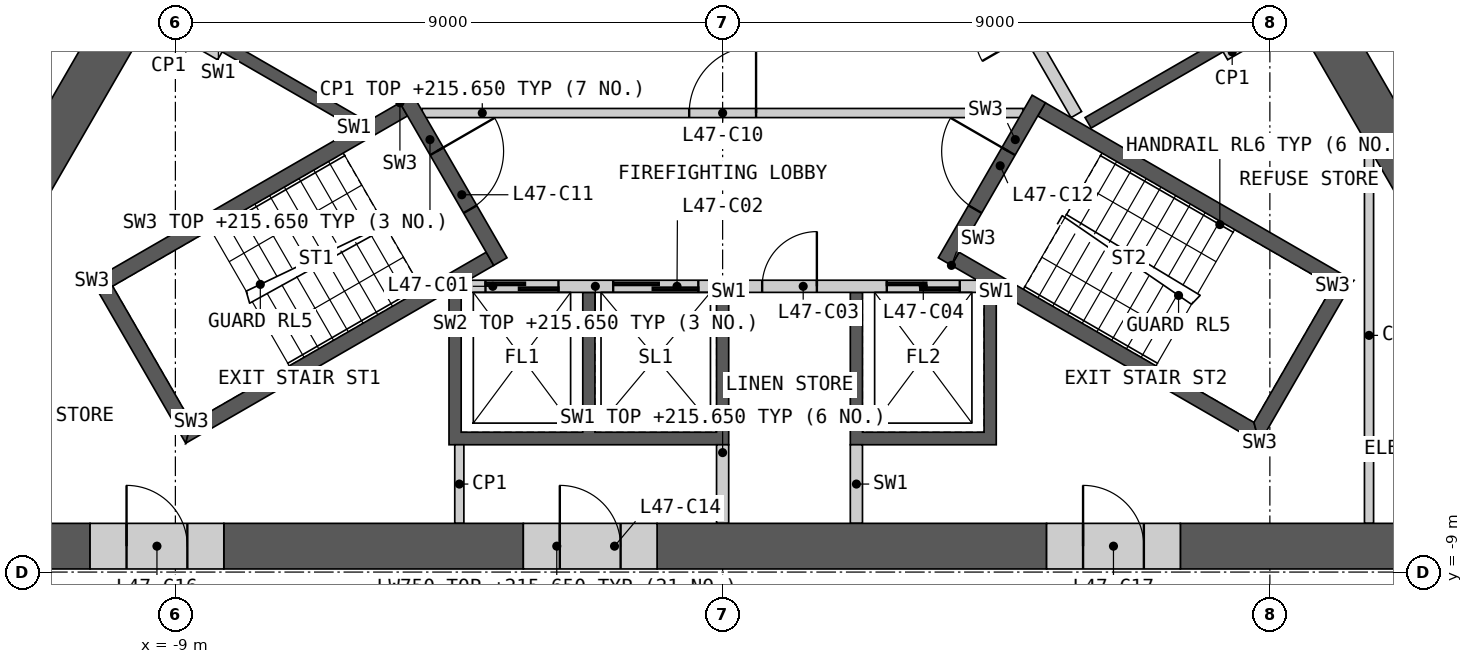
"""IFC4 building model, lengths in metres.
Left out: names, types, materials, properties, quantities, classifications, styles, units other than length and angle.
Written with IfcOpenShell. Run it as: python <this file> out.ifc"""

import sys

from ifc_helpers import new_model, si_unit, direction, frame, frame_2d, origin, place, context, subcontext, project, spatial, polyline, rectangle, outline, extrude, element, fill, save


model = new_model("IFC4")
c1 = context("Model", 3, precision=1e-05, world=origin(), true_north=direction((0.0, 1.0)))
c2 = subcontext(c1, "Body", "Model", "MODEL_VIEW")
j1 = project(units=[si_unit("LENGTHUNIT", "METRE"), si_unit("PLANEANGLEUNIT", "RADIAN")], contexts=[c1])
p1 = place(None, origin())
s1 = spatial("IfcSite", under=j1, at=p1, CompositionType="ELEMENT")
p2 = place(p1, origin())
s2 = spatial("IfcBuilding", under=s1, at=p2, CompositionType="ELEMENT")
p3 = place(p2, frame((0.0, 0.0, 212.4)))
s3 = spatial("IfcBuildingStorey", under=s2, at=p3, CompositionType="ELEMENT", Elevation=212.4)
p4 = place(p3, origin())
e1 = element("IfcWall", 1, at=p4, inside=s3, PredefinedType="SHEAR", context=c2, shape_type="SweptSolid", body=[
    extrude(outline(polyline([(4.5, -4.4), (4.5, -6.906), (2.1, -6.906), (2.1, -4.4), (2.3, -4.4), (2.3, -6.7), (4.3, -6.7), (4.3, -4.4), (4.5, -4.4)])), origin(), (0.0, 0.0, 1.0), 3.25),
])
p5 = place(p3, origin())
e2 = element("IfcWall", 2, at=p5, inside=s3, PredefinedType="SHEAR", context=c2, shape_type="SweptSolid", body=[
    extrude(outline(polyline([(0.1, -4.4), (0.1, -6.906), (-4.5, -6.906), (-4.5, -4.4), (-4.3, -4.4), (-4.3, -6.7), (-2.3, -6.7), (-2.3, -4.4), (-2.1, -4.4), (-2.1, -6.7), (-0.1, -6.7), (-0.1, -4.4), (0.1, -4.4)])), origin(), (0.0, 0.0, 1.0), 3.25),
])
p6 = place(p3, frame((-4.187, -4.3, 0.0), z_axis=(0.0, 0.0, 1.0), x_axis=(1.0, 0.0, 0.0)))
e3 = element("IfcWall", 3, at=p6, inside=s3, PredefinedType="SOLIDWALL", context=c2, shape_type="SweptSolid", body=[
    extrude(rectangle(XDim=8.373, YDim=0.2, at=frame_2d((4.187, 0.0))), origin(), (0.0, 0.0, 1.0), 3.25),
])
p7 = place(p6, frame((0.287, 0.0, 0.0)))
e4 = element("IfcOpeningElement", 4, at=p7, cuts=e3, PredefinedType="OPENING", context=c2, shape_type="SweptSolid", body=[
    extrude(rectangle(XDim=1.2, YDim=2.1, at=frame_2d((0.6, 1.05))), frame((0.0, 0.11, 0.0), z_axis=(0.0, -1.0, 0.0), x_axis=(1.0, 0.0, 0.0)), (0.0, 0.0, 1.0), 0.22),
])
p8 = place(p6, frame((2.387, 0.0, 0.0)))
e5 = element("IfcOpeningElement", 5, at=p8, cuts=e3, PredefinedType="OPENING", context=c2, shape_type="SweptSolid", body=[
    extrude(rectangle(XDim=1.4, YDim=2.1, at=frame_2d((0.7, 1.05))), frame((0.0, 0.11, 0.0), z_axis=(0.0, -1.0, 0.0), x_axis=(1.0, 0.0, 0.0)), (0.0, 0.0, 1.0), 0.22),
])
p9 = place(p6, frame((4.837, 0.0, 0.0)))
e6 = element("IfcOpeningElement", 6, at=p9, cuts=e3, PredefinedType="OPENING", context=c2, shape_type="SweptSolid", body=[
    extrude(rectangle(XDim=0.9, YDim=2.1, at=frame_2d((0.45, 1.05))), frame((0.0, 0.11, 0.0), z_axis=(0.0, -1.0, 0.0), x_axis=(1.0, 0.0, 0.0)), (0.0, 0.0, 1.0), 0.22),
])
p10 = place(p6, frame((6.887, 0.0, 0.0)))
e7 = element("IfcOpeningElement", 7, at=p10, cuts=e3, PredefinedType="OPENING", context=c2, shape_type="SweptSolid", body=[
    extrude(rectangle(XDim=1.2, YDim=2.1, at=frame_2d((0.6, 1.05))), frame((0.0, 0.11, 0.0), z_axis=(0.0, -1.0, 0.0), x_axis=(1.0, 0.0, 0.0)), (0.0, 0.0, 1.0), 0.22),
])
for number, where, z_axis, x_axis in (
    (8, (0.0, -6.906, 0.0), (0.0, 0.0, 1.0), (0.0, -1.0, 0.0)),
    (9, (2.2, -6.906, 0.0), (0.0, 0.0, 1.0), (0.0, -1.0, 0.0)),
):
    element("IfcWall", number, at=place(p3, frame(where, z_axis=z_axis, x_axis=x_axis)), inside=s3, PredefinedType="SHEAR", context=c2, shape_type="SweptSolid", body=[
        extrude(rectangle(XDim=1.293, YDim=0.2, at=frame_2d((0.646, 0.0))), origin(), (0.0, 0.0, 1.0), 3.25),
    ])
p11 = place(p3, origin())
e10 = element("IfcWall", 10, at=p11, inside=s3, PredefinedType="SHEAR", context=c2, shape_type="SweptSolid", body=[
    extrude(outline(polyline([(3.76, 2.287), (5.931, 3.54), (8.231, -0.444), (6.061, -1.697), (5.96, -1.524), (7.952, -0.374), (5.852, 3.263), (3.861, 2.113), (3.76, 2.287)])), origin(), (0.0, 0.0, 1.0), 3.25),
])
p12 = place(p3, frame((5.817, -1.476, 0.0), z_axis=(0.0, 0.0, 1.0), x_axis=(-0.500002616675, 0.866023893041, 0.0)))
e11 = element("IfcWall", 11, at=p12, inside=s3, PredefinedType="SOLIDWALL", context=c2, shape_type="SweptSolid", body=[
    extrude(rectangle(XDim=8.373, YDim=0.2, at=frame_2d((4.187, 0.0))), origin(), (0.0, 0.0, 1.0), 3.25),
])
p13 = place(p12, frame((1.537, 0.0, 0.0)))
e12 = element("IfcOpeningElement", 12, at=p13, cuts=e11, PredefinedType="OPENING", context=c2, shape_type="SweptSolid", body=[
    extrude(rectangle(XDim=0.9, YDim=2.1, at=frame_2d((0.45, 1.05))), frame((0.0, 0.11, 0.0), z_axis=(0.0, -1.0, 0.0), x_axis=(1.0, 0.0, 0.0)), (0.0, 0.0, 1.0), 0.22),
])
p14 = place(p12, frame((4.837, 0.0, 0.0)))
e13 = element("IfcOpeningElement", 13, at=p14, cuts=e11, PredefinedType="OPENING", context=c2, shape_type="SweptSolid", body=[
    extrude(rectangle(XDim=0.9, YDim=2.1, at=frame_2d((0.45, 1.05))), frame((0.0, 0.11, 0.0), z_axis=(0.0, -1.0, 0.0), x_axis=(1.0, 0.0, 0.0)), (0.0, 0.0, 1.0), 0.22),
])
p15 = place(p12, frame((6.937, 0.0, 0.0)))
e14 = element("IfcOpeningElement", 14, at=p15, cuts=e11, PredefinedType="OPENING", context=c2, shape_type="SweptSolid", body=[
    extrude(rectangle(XDim=1.1, YDim=2.1, at=frame_2d((0.55, 1.05))), frame((0.0, 0.11, 0.0), z_axis=(0.0, -1.0, 0.0), x_axis=(1.0, 0.0, 0.0)), (0.0, 0.0, 1.0), 0.22),
])
p16 = place(p3, origin())
e15 = element("IfcWall", 15, at=p16, inside=s3, PredefinedType="SHEAR", context=c2, shape_type="SweptSolid", body=[
    extrude(outline(polyline([(-6.061, -1.697), (-8.231, -0.444), (-8.131, -0.271), (-5.96, -1.524), (-6.061, -1.697)])), origin(), (0.0, 0.0, 1.0), 3.25),
])
p17 = place(p3, frame((-4.941, -1.45, 0.0), z_axis=(0.0, 0.0, 1.0), x_axis=(1.0, 0.0, 0.0)))
e16 = element("IfcWall", 16, at=p17, inside=s3, PredefinedType="PARTITIONING", context=c2, shape_type="SweptSolid", body=[
    extrude(rectangle(XDim=9.882, YDim=0.15, at=frame_2d((4.941, 0.0))), origin(), (0.0, 0.0, 1.0), 3.25),
])
p18 = place(p17, frame((4.391, 0.0, 0.0)))
e17 = element("IfcOpeningElement", 17, at=p18, cuts=e16, PredefinedType="OPENING", context=c2, shape_type="SweptSolid", body=[
    extrude(rectangle(XDim=1.1, YDim=2.1, at=frame_2d((0.55, 1.05))), frame((0.0, 0.085, 0.0), z_axis=(0.0, -1.0, 0.0), x_axis=(1.0, 0.0, 0.0)), (0.0, 0.0, 1.0), 0.17),
])
p19 = place(p3, origin())
e18 = element("IfcWall", 18, at=p19, inside=s3, PredefinedType="SHEAR", context=c2, shape_type="SweptSolid", body=[
    extrude(outline(polyline([(-5.307, -1.281), (-10.374, -4.206), (-10.032, -4.298), (-5.182, -1.498), (-5.307, -1.281)])), origin(), (0.0, 0.0, 1.0), 3.25),
])
p20 = place(p3, origin())
e19 = element("IfcWall", 19, at=p20, inside=s3, PredefinedType="SHEAR", context=c2, shape_type="SweptSolid", body=[
    extrude(outline(polyline([(-10.374, -4.206), (-8.83, -6.881), (-8.738, -6.539), (-10.032, -4.298), (-10.374, -4.206)])), origin(), (0.0, 0.0, 1.0), 3.25),
])
p21 = place(p3, origin())
e20 = element("IfcWall", 20, at=p21, inside=s3, PredefinedType="SHEAR", context=c2, shape_type="SweptSolid", body=[
    extrude(outline(polyline([(-8.738, -6.539), (-8.83, -6.881), (-3.763, -3.956), (-3.888, -3.739), (-8.738, -6.539)])), origin(), (0.0, 0.0, 1.0), 3.25),
])
p22 = place(p3, frame((-5.199, -1.219, 0.0), z_axis=(0.0, 0.0, 1.0), x_axis=(0.499982516597, -0.866035497597, 0.0)))
e21 = element("IfcWall", 21, at=p22, inside=s3, PredefinedType="SHEAR", context=c2, shape_type="SweptSolid", body=[
    extrude(rectangle(XDim=3.088, YDim=0.25, at=frame_2d((1.544, 0.0))), origin(), (0.0, 0.0, 1.0), 3.25),
])
p23 = place(p22, frame((0.994, 0.0, 0.0)))
e22 = element("IfcOpeningElement", 22, at=p23, cuts=e21, PredefinedType="OPENING", context=c2, shape_type="SweptSolid", body=[
    extrude(rectangle(XDim=1.1, YDim=2.1, at=frame_2d((0.55, 1.05))), frame((0.0, 0.135, 0.0), z_axis=(0.0, -1.0, 0.0), x_axis=(1.0, 0.0, 0.0)), (0.0, 0.0, 1.0), 0.27),
])
p24 = place(p3, origin())
e23 = element("IfcWall", 23, at=p24, inside=s3, PredefinedType="SHEAR", context=c2, shape_type="SweptSolid", body=[
    extrude(outline(polyline([(3.763, -3.956), (8.83, -6.881), (8.738, -6.539), (3.888, -3.739), (3.763, -3.956)])), origin(), (0.0, 0.0, 1.0), 3.25),
])
p25 = place(p3, origin())
e24 = element("IfcWall", 24, at=p25, inside=s3, PredefinedType="SHEAR", context=c2, shape_type="SweptSolid", body=[
    extrude(outline(polyline([(8.83, -6.881), (10.374, -4.206), (10.032, -4.298), (8.738, -6.539), (8.83, -6.881)])), origin(), (0.0, 0.0, 1.0), 3.25),
])
p26 = place(p3, origin())
e25 = element("IfcWall", 25, at=p26, inside=s3, PredefinedType="SHEAR", context=c2, shape_type="SweptSolid", body=[
    extrude(outline(polyline([(10.032, -4.298), (10.374, -4.206), (5.307, -1.281), (5.182, -1.498), (10.032, -4.298)])), origin(), (0.0, 0.0, 1.0), 3.25),
])
p27 = place(p3, frame((3.655, -3.893, 0.0), z_axis=(0.0, 0.0, 1.0), x_axis=(0.499982516597, 0.866035497597, 0.0)))
e26 = element("IfcWall", 26, at=p27, inside=s3, PredefinedType="SHEAR", context=c2, shape_type="SweptSolid", body=[
    extrude(rectangle(XDim=3.088, YDim=0.25, at=frame_2d((1.544, 0.0))), origin(), (0.0, 0.0, 1.0), 3.25),
])
p28 = place(p27, frame((0.994, 0.0, 0.0)))
e27 = element("IfcOpeningElement", 27, at=p28, cuts=e26, PredefinedType="OPENING", context=c2, shape_type="SweptSolid", body=[
    extrude(rectangle(XDim=1.1, YDim=2.1, at=frame_2d((0.55, 1.05))), frame((0.0, 0.135, 0.0), z_axis=(0.0, -1.0, 0.0), x_axis=(1.0, 0.0, 0.0)), (0.0, 0.0, 1.0), 0.27),
])
for number, where, z_axis, x_axis in (
    (28, (8.268, -0.509, 0.0), (0.0, 0.0, 1.0), (0.866, 0.5, 0.0)),
    (29, (-8.268, -0.509, 0.0), (0.0, 0.0, 1.0), (-0.866, 0.5, 0.0)),
    (30, (-4.33, -8.199, 0.0), (0.0, 0.0, 1.0), (0.0, 1.0, 0.0)),
):
    element("IfcWall", number, at=place(p3, frame(where, z_axis=z_axis, x_axis=x_axis)), inside=s3, PredefinedType="PARTITIONING", context=c2, shape_type="SweptSolid", body=[
        extrude(rectangle(XDim=1.293, YDim=0.15, at=frame_2d((0.646, 0.0))), origin(), (0.0, 0.0, 1.0), 3.25),
    ])
p29 = place(p3, frame((10.631, -8.199, 0.0), z_axis=(0.0, 0.0, 1.0), x_axis=(0.0, 1.0, 0.0)))
e31 = element("IfcWall", 31, at=p29, inside=s3, PredefinedType="PARTITIONING", context=c2, shape_type="SweptSolid", body=[
    extrude(rectangle(XDim=6.184, YDim=0.15, at=frame_2d((3.092, 0.0))), origin(), (0.0, 0.0, 1.0), 3.25),
])
p30 = place(p3, frame((7.528, -8.574, 0.0), z_axis=(0.0, 0.0, 1.0), x_axis=(1.0, 0.0, 0.0)))
e32 = element("IfcWall", 32, at=p30, inside=s3, PredefinedType="SHEAR", context=c2, shape_type="SweptSolid", body=[
    extrude(rectangle(XDim=6.673, YDim=0.75, at=frame_2d((3.336, 0.0))), origin(), (0.0, 0.0, 1.0), 3.25),
])
p31 = place(p3, frame((-1.078, -8.574, 0.0), z_axis=(0.0, 0.0, 1.0), x_axis=(1.0, 0.0, 0.0)))
e33 = element("IfcWall", 33, at=p31, inside=s3, PredefinedType="SHEAR", context=c2, shape_type="SweptSolid", body=[
    extrude(rectangle(XDim=6.406, YDim=0.75, at=frame_2d((3.203, 0.0))), origin(), (0.0, 0.0, 1.0), 3.25),
])
p32 = place(p3, frame((-8.203, -8.574, 0.0), z_axis=(0.0, 0.0, 1.0), x_axis=(1.0, 0.0, 0.0)))
e34 = element("IfcWall", 34, at=p32, inside=s3, PredefinedType="SHEAR", context=c2, shape_type="SweptSolid", body=[
    extrude(rectangle(XDim=4.926, YDim=0.75, at=frame_2d((2.463, 0.0))), origin(), (0.0, 0.0, 1.0), 3.25),
])
p33 = place(p3, frame((-14.201, -8.574, 0.0), z_axis=(0.0, 0.0, 1.0), x_axis=(1.0, 0.0, 0.0)))
e35 = element("IfcWall", 35, at=p33, inside=s3, PredefinedType="SHEAR", context=c2, shape_type="SweptSolid", body=[
    extrude(rectangle(XDim=3.798, YDim=0.75, at=frame_2d((1.899, 0.0))), origin(), (0.0, 0.0, 1.0), 3.25),
])
p34 = place(p3, frame((12.228, -4.032, 0.0), z_axis=(0.0, 0.0, 1.0), x_axis=(-0.499993760127, 0.866029006347, 0.0)))
e36 = element("IfcWall", 36, at=p34, inside=s3, PredefinedType="SHEAR", context=c2, shape_type="SweptSolid", body=[
    extrude(rectangle(XDim=6.206, YDim=0.75, at=frame_2d((3.103, 0.0))), origin(), (0.0, 0.0, 1.0), 3.25),
])
p35 = place(p3, frame((-9.625, 0.477, 0.0), z_axis=(0.0, 0.0, 1.0), x_axis=(-0.499986234705, -0.866033351035, 0.0)))
e37 = element("IfcWall", 37, at=p35, inside=s3, PredefinedType="SHEAR", context=c2, shape_type="SweptSolid", body=[
    extrude(rectangle(XDim=9.801, YDim=0.75, at=frame_2d((4.9, 0.0))), origin(), (0.0, 0.0, 1.0), 3.25),
])
p36 = place(p3, frame((-3.278, -8.574, 0.0), z_axis=(0.0, 0.0, 1.0), x_axis=(1.0, 0.0, 0.0)))
e38 = element("IfcWall", 38, at=p36, inside=s3, PredefinedType="SHEAR", context=c2, shape_type="SweptSolid", body=[
    extrude(rectangle(XDim=2.2, YDim=0.75, at=frame_2d((1.1, 0.0))), origin(), (0.0, 0.0, 1.0), 3.25),
])
p37 = place(p36, frame((0.6, 0.0, 0.0)))
e39 = element("IfcOpeningElement", 39, at=p37, cuts=e38, PredefinedType="OPENING", context=c2, shape_type="SweptSolid", body=[
    extrude(rectangle(XDim=1.0, YDim=2.1, at=frame_2d((0.5, 1.05))), frame((0.0, 0.385, 0.0), z_axis=(0.0, -1.0, 0.0), x_axis=(1.0, 0.0, 0.0)), (0.0, 0.0, 1.0), 0.77),
])
p38 = place(p3, frame((-10.403, -8.574, 0.0), z_axis=(0.0, 0.0, 1.0), x_axis=(1.0, 0.0, 0.0)))
e40 = element("IfcWall", 40, at=p38, inside=s3, PredefinedType="SHEAR", context=c2, shape_type="SweptSolid", body=[
    extrude(rectangle(XDim=2.2, YDim=0.75, at=frame_2d((1.1, 0.0))), origin(), (0.0, 0.0, 1.0), 3.25),
])
p39 = place(p38, frame((0.6, 0.0, 0.0)))
e41 = element("IfcOpeningElement", 41, at=p39, cuts=e40, PredefinedType="OPENING", context=c2, shape_type="SweptSolid", body=[
    extrude(rectangle(XDim=1.0, YDim=2.1, at=frame_2d((0.5, 1.05))), frame((0.0, 0.385, 0.0), z_axis=(0.0, -1.0, 0.0), x_axis=(1.0, 0.0, 0.0)), (0.0, 0.0, 1.0), 0.77),
])
p40 = place(p3, frame((5.328, -8.574, 0.0), z_axis=(0.0, 0.0, 1.0), x_axis=(1.0, 0.0, 0.0)))
e42 = element("IfcWall", 42, at=p40, inside=s3, PredefinedType="SHEAR", context=c2, shape_type="SweptSolid", body=[
    extrude(rectangle(XDim=2.2, YDim=0.75, at=frame_2d((1.1, 0.0))), origin(), (0.0, 0.0, 1.0), 3.25),
])
p41 = place(p40, frame((0.6, 0.0, 0.0)))
e43 = element("IfcOpeningElement", 43, at=p41, cuts=e42, PredefinedType="OPENING", context=c2, shape_type="SweptSolid", body=[
    extrude(rectangle(XDim=1.0, YDim=2.1, at=frame_2d((0.5, 1.05))), frame((0.0, 0.385, 0.0), z_axis=(0.0, -1.0, 0.0), x_axis=(1.0, 0.0, 0.0)), (0.0, 0.0, 1.0), 0.77),
])
p42 = place(p3, frame((5.377, 19.385, 0.0), z_axis=(0.0, 0.0, 1.0), x_axis=(0.500000757641, -0.86602496636, 0.0)))
e44 = element("IfcWall", 44, at=p42, inside=s3, PredefinedType="PARTITIONING", context=c2, shape_type="SweptSolid", body=[
    extrude(rectangle(XDim=28.198, YDim=0.2, at=frame_2d((14.099, 0.0))), origin(), (0.0, 0.0, 1.0), 3.25),
])
p43 = place(p42, frame((25.345, 0.0, 0.0)))
e45 = element("IfcOpeningElement", 45, at=p43, cuts=e44, PredefinedType="OPENING", context=c2, shape_type="SweptSolid", body=[
    extrude(rectangle(XDim=1.8, YDim=2.1, at=frame_2d((0.9, 1.05))), frame((0.0, 0.11, 0.0), z_axis=(0.0, -1.0, 0.0), x_axis=(1.0, 0.0, 0.0)), (0.0, 0.0, 1.0), 0.22),
])
p44 = place(p42, frame((19.621, 0.0, 0.0)))
e46 = element("IfcOpeningElement", 46, at=p44, cuts=e44, PredefinedType="OPENING", context=c2, shape_type="SweptSolid", body=[
    extrude(rectangle(XDim=1.0, YDim=2.1, at=frame_2d((0.5, 1.05))), frame((0.0, 0.11, 0.0), z_axis=(0.0, -1.0, 0.0), x_axis=(1.0, 0.0, 0.0)), (0.0, 0.0, 1.0), 0.22),
])
p45 = place(p42, frame((16.409, 0.0, 0.0)))
e47 = element("IfcOpeningElement", 47, at=p45, cuts=e44, PredefinedType="OPENING", context=c2, shape_type="SweptSolid", body=[
    extrude(rectangle(XDim=1.1, YDim=2.1, at=frame_2d((0.55, 1.05))), frame((0.0, 0.11, 0.0), z_axis=(0.0, -1.0, 0.0), x_axis=(1.0, 0.0, 0.0)), (0.0, 0.0, 1.0), 0.22),
])
p46 = place(p42, frame((1.452, 0.0, 0.0)))
e48 = element("IfcOpeningElement", 48, at=p46, cuts=e44, PredefinedType="OPENING", context=c2, shape_type="SweptSolid", body=[
    extrude(rectangle(XDim=0.95, YDim=2.1, at=frame_2d((0.475, 1.05))), frame((0.0, 0.11, 0.0), z_axis=(0.0, -1.0, 0.0), x_axis=(1.0, 0.0, 0.0)), (0.0, 0.0, 1.0), 0.22),
])
p47 = place(p3, frame((-14.619, -2.624, 0.0), z_axis=(0.0, 0.0, 1.0), x_axis=(0.50000393355, 0.866023132736, 0.0)))
e49 = element("IfcWall", 49, at=p47, inside=s3, PredefinedType="PARTITIONING", context=c2, shape_type="SweptSolid", body=[
    extrude(rectangle(XDim=9.335, YDim=0.2, at=frame_2d((4.667, 0.0))), origin(), (0.0, 0.0, 1.0), 3.25),
])
p48 = place(p47, frame((3.062, 0.0, 0.0)))
e50 = element("IfcOpeningElement", 50, at=p48, cuts=e49, PredefinedType="OPENING", context=c2, shape_type="SweptSolid", body=[
    extrude(rectangle(XDim=1.0, YDim=2.1, at=frame_2d((0.5, 1.05))), frame((0.0, 0.11, 0.0), z_axis=(0.0, -1.0, 0.0), x_axis=(1.0, 0.0, 0.0)), (0.0, 0.0, 1.0), 0.22),
])
p49 = place(p7, origin())
e51 = element("IfcDoor", 51, at=p49, inside=s3, OperationType="SLIDING_TO_LEFT", PredefinedType="DOOR", context=c2, shape_type="SweptSolid", body=[
    extrude(rectangle(XDim=1.2, YDim=2.1, at=frame_2d((0.6, 1.05))), frame((0.0, 0.025, 0.0), z_axis=(0.0, -1.0, 0.0), x_axis=(1.0, 0.0, 0.0)), (0.0, 0.0, 1.0), 0.05),
])
fill(e4, e51)
p50 = place(p8, origin())
e52 = element("IfcDoor", 52, at=p50, inside=s3, OperationType="SLIDING_TO_LEFT", PredefinedType="DOOR", context=c2, shape_type="SweptSolid", body=[
    extrude(rectangle(XDim=1.4, YDim=2.1, at=frame_2d((0.7, 1.05))), frame((0.0, 0.025, 0.0), z_axis=(0.0, -1.0, 0.0), x_axis=(1.0, 0.0, 0.0)), (0.0, 0.0, 1.0), 0.05),
])
fill(e5, e52)
p51 = place(p9, origin())
e53 = element("IfcDoor", 53, at=p51, inside=s3, OperationType="SINGLE_SWING_RIGHT", PredefinedType="DOOR", context=c2, shape_type="SweptSolid", body=[
    extrude(rectangle(XDim=0.9, YDim=2.1, at=frame_2d((0.45, 1.05))), frame((0.0, 0.025, 0.0), z_axis=(0.0, -1.0, 0.0), x_axis=(1.0, 0.0, 0.0)), (0.0, 0.0, 1.0), 0.05),
])
fill(e6, e53)
p52 = place(p10, origin())
e54 = element("IfcDoor", 54, at=p52, inside=s3, OperationType="SLIDING_TO_LEFT", PredefinedType="DOOR", context=c2, shape_type="SweptSolid", body=[
    extrude(rectangle(XDim=1.2, YDim=2.1, at=frame_2d((0.6, 1.05))), frame((0.0, 0.025, 0.0), z_axis=(0.0, -1.0, 0.0), x_axis=(1.0, 0.0, 0.0)), (0.0, 0.0, 1.0), 0.05),
])
fill(e7, e54)
p53 = place(p18, origin())
e55 = element("IfcDoor", 55, at=p53, inside=s3, OperationType="SINGLE_SWING_RIGHT", PredefinedType="DOOR", context=c2, shape_type="SweptSolid", body=[
    extrude(rectangle(XDim=1.1, YDim=2.1, at=frame_2d((0.55, 1.05))), frame((0.0, 0.025, 0.0), z_axis=(0.0, -1.0, 0.0), x_axis=(1.0, 0.0, 0.0)), (0.0, 0.0, 1.0), 0.05),
])
fill(e17, e55)
p54 = place(p23, origin())
e56 = element("IfcDoor", 56, at=p54, inside=s3, OperationType="SINGLE_SWING_LEFT", PredefinedType="DOOR", context=c2, shape_type="SweptSolid", body=[
    extrude(rectangle(XDim=1.1, YDim=2.1, at=frame_2d((0.55, 1.05))), frame((0.0, 0.025, 0.0), z_axis=(0.0, -1.0, 0.0), x_axis=(1.0, 0.0, 0.0)), (0.0, 0.0, 1.0), 0.05),
])
fill(e22, e56)
p55 = place(p28, origin())
e57 = element("IfcDoor", 57, at=p55, inside=s3, OperationType="SINGLE_SWING_RIGHT", PredefinedType="DOOR", context=c2, shape_type="SweptSolid", body=[
    extrude(rectangle(XDim=1.1, YDim=2.1, at=frame_2d((0.55, 1.05))), frame((0.0, 0.025, 0.0), z_axis=(0.0, -1.0, 0.0), x_axis=(1.0, 0.0, 0.0)), (0.0, 0.0, 1.0), 0.05),
])
fill(e27, e57)
p56 = place(p37, origin())
e58 = element("IfcDoor", 58, at=p56, inside=s3, OperationType="SINGLE_SWING_LEFT", PredefinedType="DOOR", context=c2, shape_type="SweptSolid", body=[
    extrude(rectangle(XDim=1.0, YDim=2.1, at=frame_2d((0.5, 1.05))), frame((0.0, 0.13, 0.0), z_axis=(0.0, -1.0, 0.0), x_axis=(1.0, 0.0, 0.0)), (0.0, 0.0, 1.0), 0.05),
])
fill(e39, e58)
p57 = place(p39, origin())
e59 = element("IfcDoor", 59, at=p57, inside=s3, OperationType="SINGLE_SWING_LEFT", PredefinedType="DOOR", context=c2, shape_type="SweptSolid", body=[
    extrude(rectangle(XDim=1.0, YDim=2.1, at=frame_2d((0.5, 1.05))), frame((0.0, 0.13, 0.0), z_axis=(0.0, -1.0, 0.0), x_axis=(1.0, 0.0, 0.0)), (0.0, 0.0, 1.0), 0.05),
])
fill(e41, e59)
p58 = place(p41, origin())
e60 = element("IfcDoor", 60, at=p58, inside=s3, OperationType="SINGLE_SWING_LEFT", PredefinedType="DOOR", context=c2, shape_type="SweptSolid", body=[
    extrude(rectangle(XDim=1.0, YDim=2.1, at=frame_2d((0.5, 1.05))), frame((0.0, 0.13, 0.0), z_axis=(0.0, -1.0, 0.0), x_axis=(1.0, 0.0, 0.0)), (0.0, 0.0, 1.0), 0.05),
])
fill(e43, e60)
save(model, sys.argv[1])
